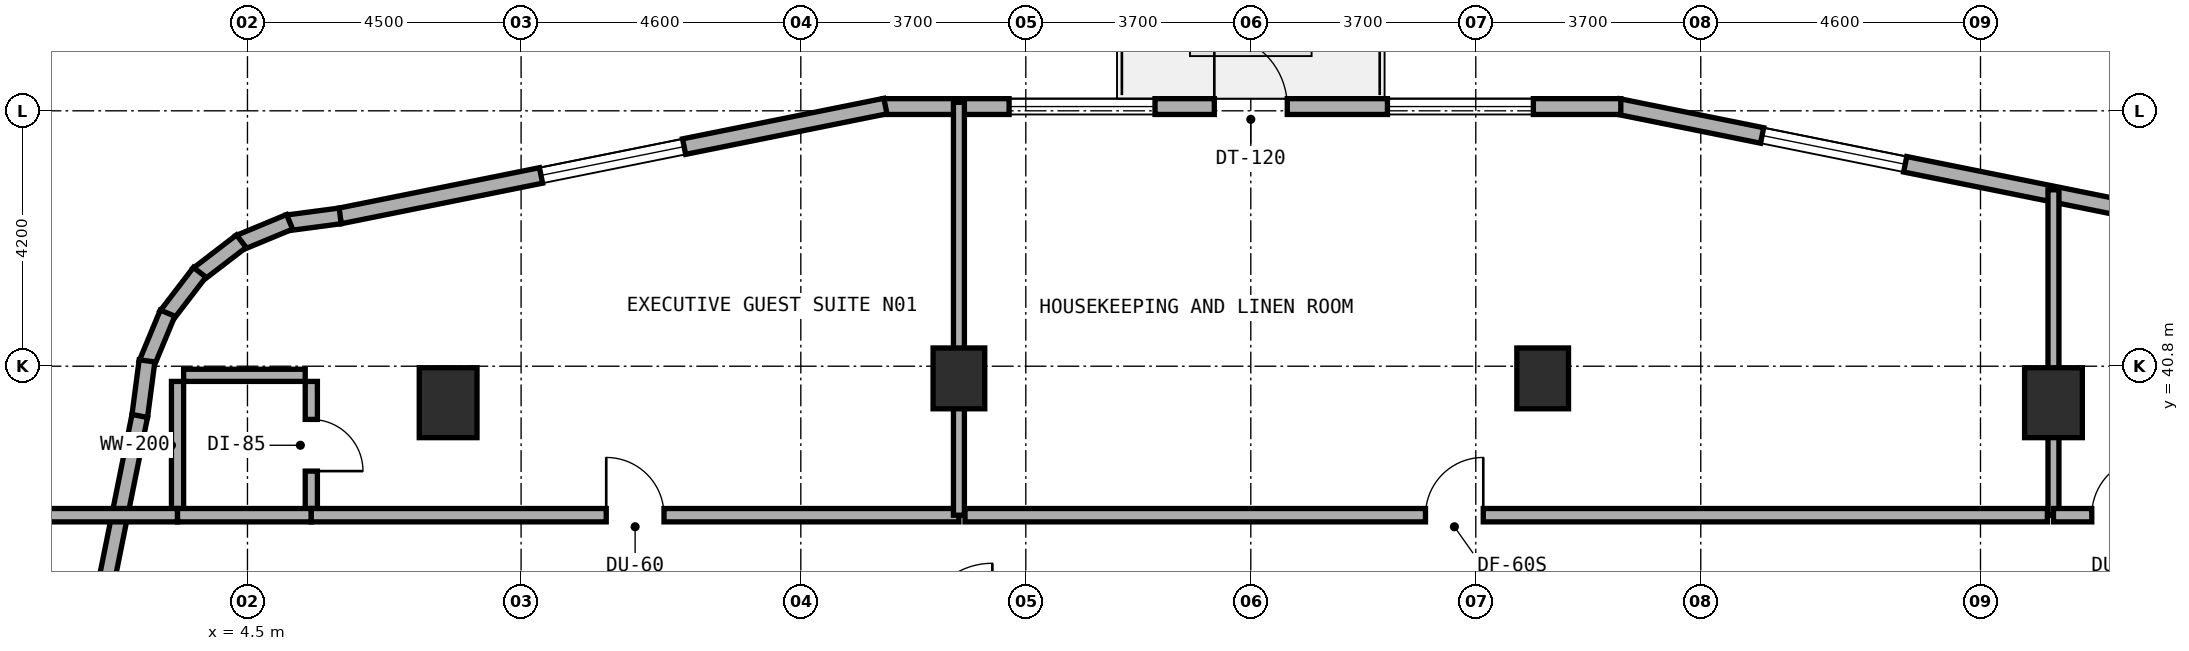
"""IFC4 building model, lengths in metres.
Left out: names, types, materials, properties, quantities, classifications, styles, units other than length and angle.
Written with IfcOpenShell. Run it as: python <this file> out.ifc"""

import sys

from ifc_helpers import new_model, si_unit, direction, frame, frame_2d, origin, origin_2d, place, context, subcontext, project, spatial, rectangle, extrude, element, fill, save


model = new_model("IFC4")
c1 = context("Model", 3, precision=1e-05, world=origin(), true_north=direction((0.0, 1.0)))
c2 = subcontext(c1, "Body", "Model", "MODEL_VIEW")
j1 = project(units=[si_unit("LENGTHUNIT", "METRE"), si_unit("PLANEANGLEUNIT", "RADIAN")], contexts=[c1])
p1 = place(None, origin())
s1 = spatial("IfcSite", under=j1, at=p1, CompositionType="ELEMENT")
p2 = place(p1, origin())
s2 = spatial("IfcBuilding", under=s1, at=p2, CompositionType="ELEMENT")
p3 = place(p2, frame((0.0, 0.0, 124.0)))
s3 = spatial("IfcBuildingStorey", under=s2, at=p3, CompositionType="ELEMENT", Elevation=124.0)
for number, where, z_axis, x_axis in (
    (1, (16.2, 40.6, 0.0), (0.0, 0.0, 1.0), (1.0, 0.0, 0.0)),
    (2, (25.8, 40.6, 0.0), (0.0, 0.0, 1.0), (1.0, 0.0, 0.0)),
):
    element("IfcColumn", number, at=place(p3, frame(where, z_axis=z_axis, x_axis=x_axis)), inside=s3, PredefinedType="COLUMN", context=c2, shape_type="SweptSolid", body=[
        extrude(rectangle(XDim=0.85, YDim=1.0, at=origin_2d()), origin(), (0.0, 0.0, 1.0), 3.5),
    ])
for number, where, z_axis, x_axis in (
    (3, (34.2, 40.2, 0.0), (0.0, 0.0, 1.0), (1.0, 0.0, 0.0)),
    (4, (7.8, 40.2, 0.0), (0.0, 0.0, 1.0), (1.0, 0.0, 0.0)),
):
    element("IfcColumn", number, at=place(p3, frame(where, z_axis=z_axis, x_axis=x_axis)), inside=s3, PredefinedType="COLUMN", context=c2, shape_type="SweptSolid", body=[
        extrude(rectangle(XDim=0.95, YDim=1.15, at=origin_2d()), origin(), (0.0, 0.0, 1.0), 3.5),
    ])
p4 = place(p3, frame((35.982, 43.271, 0.0), z_axis=(0.0, 0.0, 1.0), x_axis=(-0.980317172899, 0.197429077186, 0.0)))
e5 = element("IfcWall", 5, at=p4, inside=s3, PredefinedType="STANDARD", context=c2, shape_type="SweptSolid", body=[
    extrude(rectangle(XDim=9.117, YDim=0.26, at=frame_2d((4.559, 0.0))), origin(), (0.0, 0.0, 1.0), 3.22),
])
p5 = place(p4, frame((4.305, 0.0, 0.8)))
e6 = element("IfcOpeningElement", 6, at=p5, cuts=e5, PredefinedType="OPENING", context=c2, shape_type="SweptSolid", body=[
    extrude(rectangle(XDim=2.4, YDim=1.6, at=frame_2d((1.2, 0.8))), frame((0.0, 0.14, 0.0), z_axis=(0.0, -1.0, 0.0), x_axis=(1.0, 0.0, 0.0)), (0.0, 0.0, 1.0), 0.28),
])
p6 = place(p3, frame((27.085, 45.07, 0.0), z_axis=(0.0, 0.0, 1.0), x_axis=(-1.0, 0.0, 0.0)))
e7 = element("IfcWall", 7, at=p6, inside=s3, PredefinedType="STANDARD", context=c2, shape_type="SweptSolid", body=[
    extrude(rectangle(XDim=12.135, YDim=0.26, at=frame_2d((6.067, 0.0))), origin(), (0.0, 0.0, 1.0), 3.22),
])
p7 = place(p6, frame((5.485, 0.0, 0.0)))
e8 = element("IfcOpeningElement", 8, at=p7, cuts=e7, PredefinedType="OPENING", context=c2, shape_type="SweptSolid", body=[
    extrude(rectangle(XDim=1.2, YDim=2.15, at=frame_2d((0.6, 1.075))), frame((0.0, 0.14, 0.0), z_axis=(0.0, -1.0, 0.0), x_axis=(1.0, 0.0, 0.0)), (0.0, 0.0, 1.0), 0.28),
])
p8 = place(p6, frame((1.438, 0.0, 0.8)))
e9 = element("IfcOpeningElement", 9, at=p8, cuts=e7, PredefinedType="OPENING", context=c2, shape_type="SweptSolid", body=[
    extrude(rectangle(XDim=2.4, YDim=1.6, at=frame_2d((1.2, 0.8))), frame((0.0, 0.14, 0.0), z_axis=(0.0, -1.0, 0.0), x_axis=(1.0, 0.0, 0.0)), (0.0, 0.0, 1.0), 0.28),
])
p9 = place(p6, frame((7.66, 0.0, 0.8)))
e10 = element("IfcOpeningElement", 10, at=p9, cuts=e7, PredefinedType="OPENING", context=c2, shape_type="SweptSolid", body=[
    extrude(rectangle(XDim=2.4, YDim=1.6, at=frame_2d((1.2, 0.8))), frame((0.0, 0.14, 0.0), z_axis=(0.0, -1.0, 0.0), x_axis=(1.0, 0.0, 0.0)), (0.0, 0.0, 1.0), 0.28),
])
p10 = place(p3, frame((14.991, 45.078, 0.0), z_axis=(0.0, 0.0, 1.0), x_axis=(-0.980321298532, -0.197408590603, 0.0)))
e11 = element("IfcWall", 11, at=p10, inside=s3, PredefinedType="STANDARD", context=c2, shape_type="SweptSolid", body=[
    extrude(rectangle(XDim=9.153, YDim=0.26, at=frame_2d((4.577, 0.0))), origin(), (0.0, 0.0, 1.0), 3.22),
])
p11 = place(p10, frame((3.377, 0.0, 0.8)))
e12 = element("IfcOpeningElement", 12, at=p11, cuts=e11, PredefinedType="OPENING", context=c2, shape_type="SweptSolid", body=[
    extrude(rectangle(XDim=2.4, YDim=1.6, at=frame_2d((1.2, 0.8))), frame((0.0, 0.14, 0.0), z_axis=(0.0, -1.0, 0.0), x_axis=(1.0, 0.0, 0.0)), (0.0, 0.0, 1.0), 0.28),
])
p12 = place(p3, frame((6.025, 43.272, 0.0), z_axis=(0.0, 0.0, 1.0), x_axis=(-0.991388484223, -0.130953706898, 0.0)))
e13 = element("IfcWall", 13, at=p12, inside=s3, PredefinedType="STANDARD", context=c2, shape_type="SweptSolid", body=[
    extrude(rectangle(XDim=0.885, YDim=0.26, at=frame_2d((0.443, 0.0))), origin(), (0.0, 0.0, 1.0), 3.22),
])
p13 = place(p3, frame((5.193, 43.174, 0.0), z_axis=(0.0, 0.0, 1.0), x_axis=(-0.923627776508, -0.383290660547, 0.0)))
e14 = element("IfcWall", 14, at=p13, inside=s3, PredefinedType="STANDARD", context=c2, shape_type="SweptSolid", body=[
    extrude(rectangle(XDim=0.903, YDim=0.26, at=frame_2d((0.452, 0.0))), origin(), (0.0, 0.0, 1.0), 3.22),
])
p14 = place(p3, frame((4.399, 42.856, 0.0), z_axis=(0.0, 0.0, 1.0), x_axis=(-0.793458244748, -0.608624690463, 0.0)))
e15 = element("IfcWall", 15, at=p14, inside=s3, PredefinedType="STANDARD", context=c2, shape_type="SweptSolid", body=[
    extrude(rectangle(XDim=0.902, YDim=0.26, at=frame_2d((0.451, 0.0))), origin(), (0.0, 0.0, 1.0), 3.22),
])
p15 = place(p3, frame((3.714, 42.345, 0.0), z_axis=(0.0, 0.0, 1.0), x_axis=(-0.608494022858, -0.793558456666, 0.0)))
e16 = element("IfcWall", 16, at=p15, inside=s3, PredefinedType="STANDARD", context=c2, shape_type="SweptSolid", body=[
    extrude(rectangle(XDim=0.902, YDim=0.26, at=frame_2d((0.451, 0.0))), origin(), (0.0, 0.0, 1.0), 3.22),
])
p16 = place(p3, frame((3.186, 41.673, 0.0), z_axis=(0.0, 0.0, 1.0), x_axis=(-0.383155708213, -0.923683767999, 0.0)))
e17 = element("IfcWall", 17, at=p16, inside=s3, PredefinedType="STANDARD", context=c2, shape_type="SweptSolid", body=[
    extrude(rectangle(XDim=0.903, YDim=0.26, at=frame_2d((0.451, 0.0))), origin(), (0.0, 0.0, 1.0), 3.22),
])
p17 = place(p3, frame((2.848, 40.888, 0.0), z_axis=(0.0, 0.0, 1.0), x_axis=(-0.130200706103, -0.991487658083, 0.0)))
e18 = element("IfcWall", 18, at=p17, inside=s3, PredefinedType="STANDARD", context=c2, shape_type="SweptSolid", body=[
    extrude(rectangle(XDim=0.921, YDim=0.26, at=frame_2d((0.46, 0.0))), origin(), (0.0, 0.0, 1.0), 3.22),
])
p18 = place(p3, frame((2.729, 39.982, 0.0), z_axis=(0.0, 0.0, 1.0), x_axis=(-0.197435082048, -0.980315963543, 0.0)))
e19 = element("IfcWall", 19, at=p18, inside=s3, PredefinedType="STANDARD", context=c2, shape_type="SweptSolid", body=[
    extrude(rectangle(XDim=9.183, YDim=0.26, at=frame_2d((4.591, 0.0))), origin(), (0.0, 0.0, 1.0), 3.22),
])
p19 = place(p18, frame((4.286, 0.0, 0.8)))
e20 = element("IfcOpeningElement", 20, at=p19, cuts=e19, PredefinedType="OPENING", context=c2, shape_type="SweptSolid", body=[
    extrude(rectangle(XDim=2.4, YDim=1.6, at=frame_2d((1.2, 0.8))), frame((0.0, 0.14, 0.0), z_axis=(0.0, -1.0, 0.0), x_axis=(1.0, 0.0, 0.0)), (0.0, 0.0, 1.0), 0.28),
])
p20 = place(p3, frame((5.55, 38.45, 0.0), z_axis=(0.0, 0.0, 1.0), x_axis=(0.0, 1.0, 0.0)))
e21 = element("IfcWall", 21, at=p20, inside=s3, PredefinedType="PLUMBINGWALL", context=c2, shape_type="SweptSolid", body=[
    extrude(rectangle(XDim=2.1, YDim=0.2, at=frame_2d((1.05, 0.0))), origin(), (0.0, 0.0, 1.0), 3.22),
])
p21 = place(p20, frame((0.625, 0.0, 0.0)))
e22 = element("IfcOpeningElement", 22, at=p21, cuts=e21, PredefinedType="OPENING", context=c2, shape_type="SweptSolid", body=[
    extrude(rectangle(XDim=0.85, YDim=2.1, at=frame_2d((0.425, 1.05))), frame((0.0, 0.11, 0.0), z_axis=(0.0, -1.0, 0.0), x_axis=(1.0, 0.0, 0.0)), (0.0, 0.0, 1.0), 0.22),
])
p22 = place(p3, frame((3.45, 40.65, 0.0), z_axis=(0.0, 0.0, 1.0), x_axis=(1.0, 0.0, 0.0)))
e23 = element("IfcWall", 23, at=p22, inside=s3, PredefinedType="PLUMBINGWALL", context=c2, shape_type="SweptSolid", body=[
    extrude(rectangle(XDim=2.0, YDim=0.2, at=frame_2d((1.0, 0.0))), origin(), (0.0, 0.0, 1.0), 3.22),
])
p23 = place(p3, frame((3.35, 38.45, 0.0), z_axis=(0.0, 0.0, 1.0), x_axis=(0.0, 1.0, 0.0)))
e24 = element("IfcWall", 24, at=p23, inside=s3, PredefinedType="PLUMBINGWALL", context=c2, shape_type="SweptSolid", body=[
    extrude(rectangle(XDim=2.1, YDim=0.2, at=frame_2d((1.05, 0.0))), origin(), (0.0, 0.0, 1.0), 3.22),
])
p24 = place(p3, frame((0.96, 38.35, 0.0), z_axis=(0.0, 0.0, 1.0), x_axis=(1.0, 0.0, 0.0)))
e25 = element("IfcWall", 25, at=p24, inside=s3, PredefinedType="SOLIDWALL", context=c2, shape_type="SweptSolid", body=[
    extrude(rectangle(XDim=2.39, YDim=0.22, at=frame_2d((1.195, 0.0))), origin(), (0.0, 0.0, 1.0), 3.22),
])
p25 = place(p3, frame((3.35, 38.35, 0.0), z_axis=(0.0, 0.0, 1.0), x_axis=(1.0, 0.0, 0.0)))
e26 = element("IfcWall", 26, at=p25, inside=s3, PredefinedType="SOLIDWALL", context=c2, shape_type="SweptSolid", body=[
    extrude(rectangle(XDim=2.2, YDim=0.22, at=frame_2d((1.1, 0.0))), origin(), (0.0, 0.0, 1.0), 3.22),
])
p26 = place(p3, frame((5.55, 38.35, 0.0), z_axis=(0.0, 0.0, 1.0), x_axis=(1.0, 0.0, 0.0)))
e27 = element("IfcWall", 27, at=p26, inside=s3, PredefinedType="SOLIDWALL", context=c2, shape_type="SweptSolid", body=[
    extrude(rectangle(XDim=10.65, YDim=0.22, at=frame_2d((5.325, 0.0))), origin(), (0.0, 0.0, 1.0), 2.695),
])
p27 = place(p26, frame((4.85, 0.0, 0.0)))
e28 = element("IfcOpeningElement", 28, at=p27, cuts=e27, PredefinedType="OPENING", context=c2, shape_type="SweptSolid", body=[
    extrude(rectangle(XDim=0.95, YDim=2.1, at=frame_2d((0.475, 1.05))), frame((0.0, 0.12, 0.0), z_axis=(0.0, -1.0, 0.0), x_axis=(1.0, 0.0, 0.0)), (0.0, 0.0, 1.0), 0.24),
])
p28 = place(p3, frame((16.2, 38.35, 0.0), z_axis=(0.0, 0.0, 1.0), x_axis=(0.0, 1.0, 0.0)))
e29 = element("IfcWall", 29, at=p28, inside=s3, PredefinedType="SOLIDWALL", context=c2, shape_type="SweptSolid", body=[
    extrude(rectangle(XDim=6.79, YDim=0.18, at=frame_2d((3.395, 0.0))), origin(), (0.0, 0.0, 1.0), 2.695),
])
p29 = place(p3, frame((16.3, 38.35, 0.0), z_axis=(0.0, 0.0, 1.0), x_axis=(1.0, 0.0, 0.0)))
e30 = element("IfcWall", 30, at=p29, inside=s3, PredefinedType="SOLIDWALL", context=c2, shape_type="SweptSolid", body=[
    extrude(rectangle(XDim=17.8, YDim=0.22, at=frame_2d((8.9, 0.0))), origin(), (0.0, 0.0, 1.0), 2.695),
])
p30 = place(p29, frame((7.573, 0.0, 0.0)))
e31 = element("IfcOpeningElement", 31, at=p30, cuts=e30, PredefinedType="OPENING", context=c2, shape_type="SweptSolid", body=[
    extrude(rectangle(XDim=0.95, YDim=2.1, at=frame_2d((0.475, 1.05))), frame((0.0, 0.12, 0.0), z_axis=(0.0, -1.0, 0.0), x_axis=(1.0, 0.0, 0.0)), (0.0, 0.0, 1.0), 0.24),
])
p31 = place(p3, frame((34.2, 38.35, 0.0), z_axis=(0.0, 0.0, 1.0), x_axis=(0.0, 1.0, 0.0)))
e32 = element("IfcWall", 32, at=p31, inside=s3, PredefinedType="SOLIDWALL", context=c2, shape_type="SweptSolid", body=[
    extrude(rectangle(XDim=5.351, YDim=0.18, at=frame_2d((2.675, 0.0))), origin(), (0.0, 0.0, 1.0), 2.695),
])
p32 = place(p3, frame((34.2, 38.35, 0.0), z_axis=(0.0, 0.0, 1.0), x_axis=(1.0, 0.0, 0.0)))
e33 = element("IfcWall", 33, at=p32, inside=s3, PredefinedType="SOLIDWALL", context=c2, shape_type="SweptSolid", body=[
    extrude(rectangle(XDim=2.25, YDim=0.22, at=frame_2d((1.125, 0.0))), origin(), (0.0, 0.0, 1.0), 2.695),
])
p33 = place(p32, frame((0.63, 0.0, 0.0)))
e34 = element("IfcOpeningElement", 34, at=p33, cuts=e33, PredefinedType="OPENING", context=c2, shape_type="SweptSolid", body=[
    extrude(rectangle(XDim=0.95, YDim=2.1, at=frame_2d((0.475, 1.05))), frame((0.0, 0.12, 0.0), z_axis=(0.0, -1.0, 0.0), x_axis=(1.0, 0.0, 0.0)), (0.0, 0.0, 1.0), 0.24),
])
p34 = place(p5, origin())
e35 = element("IfcWindow", 35, at=p34, inside=s3, PartitioningType="SINGLE_PANEL", PredefinedType="WINDOW", context=c2, shape_type="SweptSolid", body=[
    extrude(rectangle(XDim=2.4, YDim=1.6, at=frame_2d((1.2, 0.8))), frame((0.0, 0.03, 0.0), z_axis=(0.0, -1.0, 0.0), x_axis=(1.0, 0.0, 0.0)), (0.0, 0.0, 1.0), 0.06),
])
fill(e6, e35)
p35 = place(p7, frame((1.2, 0.0, 0.0), z_axis=(0.0, 0.0, 1.0), x_axis=(-1.0, 0.0, 0.0)))
e36 = element("IfcDoor", 36, at=p35, inside=s3, OperationType="SINGLE_SWING_LEFT", PredefinedType="DOOR", context=c2, shape_type="SweptSolid", body=[
    extrude(rectangle(XDim=1.2, YDim=2.15, at=frame_2d((0.6, 1.075))), frame((0.0, 0.025, 0.0), z_axis=(0.0, -1.0, 0.0), x_axis=(1.0, 0.0, 0.0)), (0.0, 0.0, 1.0), 0.05),
])
fill(e8, e36)
p36 = place(p8, origin())
e37 = element("IfcWindow", 37, at=p36, inside=s3, PartitioningType="SINGLE_PANEL", PredefinedType="WINDOW", context=c2, shape_type="SweptSolid", body=[
    extrude(rectangle(XDim=2.4, YDim=1.6, at=frame_2d((1.2, 0.8))), frame((0.0, 0.03, 0.0), z_axis=(0.0, -1.0, 0.0), x_axis=(1.0, 0.0, 0.0)), (0.0, 0.0, 1.0), 0.06),
])
fill(e9, e37)
p37 = place(p9, origin())
e38 = element("IfcWindow", 38, at=p37, inside=s3, PartitioningType="SINGLE_PANEL", PredefinedType="WINDOW", context=c2, shape_type="SweptSolid", body=[
    extrude(rectangle(XDim=2.4, YDim=1.6, at=frame_2d((1.2, 0.8))), frame((0.0, 0.03, 0.0), z_axis=(0.0, -1.0, 0.0), x_axis=(1.0, 0.0, 0.0)), (0.0, 0.0, 1.0), 0.06),
])
fill(e10, e38)
p38 = place(p11, origin())
e39 = element("IfcWindow", 39, at=p38, inside=s3, PartitioningType="SINGLE_PANEL", PredefinedType="WINDOW", context=c2, shape_type="SweptSolid", body=[
    extrude(rectangle(XDim=2.4, YDim=1.6, at=frame_2d((1.2, 0.8))), frame((0.0, 0.03, 0.0), z_axis=(0.0, -1.0, 0.0), x_axis=(1.0, 0.0, 0.0)), (0.0, 0.0, 1.0), 0.06),
])
fill(e12, e39)
p39 = place(p21, frame((0.85, 0.0, 0.0), z_axis=(0.0, 0.0, 1.0), x_axis=(-1.0, 0.0, 0.0)))
e40 = element("IfcDoor", 40, at=p39, inside=s3, OperationType="SINGLE_SWING_RIGHT", PredefinedType="DOOR", context=c2, shape_type="SweptSolid", body=[
    extrude(rectangle(XDim=0.85, YDim=2.1, at=frame_2d((0.425, 1.05))), frame((0.0, 0.025, 0.0), z_axis=(0.0, -1.0, 0.0), x_axis=(1.0, 0.0, 0.0)), (0.0, 0.0, 1.0), 0.05),
])
fill(e22, e40)
p40 = place(p27, origin())
e41 = element("IfcDoor", 41, at=p40, inside=s3, OperationType="SINGLE_SWING_LEFT", PredefinedType="DOOR", context=c2, shape_type="SweptSolid", body=[
    extrude(rectangle(XDim=0.95, YDim=2.1, at=frame_2d((0.475, 1.05))), frame((0.0, 0.025, 0.0), z_axis=(0.0, -1.0, 0.0), x_axis=(1.0, 0.0, 0.0)), (0.0, 0.0, 1.0), 0.05),
])
fill(e28, e41)
p41 = place(p30, origin())
e42 = element("IfcDoor", 42, at=p41, inside=s3, OperationType="SINGLE_SWING_RIGHT", PredefinedType="DOOR", context=c2, shape_type="SweptSolid", body=[
    extrude(rectangle(XDim=0.95, YDim=2.1, at=frame_2d((0.475, 1.05))), frame((0.0, 0.025, 0.0), z_axis=(0.0, -1.0, 0.0), x_axis=(1.0, 0.0, 0.0)), (0.0, 0.0, 1.0), 0.05),
])
fill(e31, e42)
p42 = place(p33, origin())
e43 = element("IfcDoor", 43, at=p42, inside=s3, OperationType="SINGLE_SWING_RIGHT", PredefinedType="DOOR", context=c2, shape_type="SweptSolid", body=[
    extrude(rectangle(XDim=0.95, YDim=2.1, at=frame_2d((0.475, 1.05))), frame((0.0, 0.025, 0.0), z_axis=(0.0, -1.0, 0.0), x_axis=(1.0, 0.0, 0.0)), (0.0, 0.0, 1.0), 0.05),
])
fill(e34, e43)
save(model, sys.argv[1])
